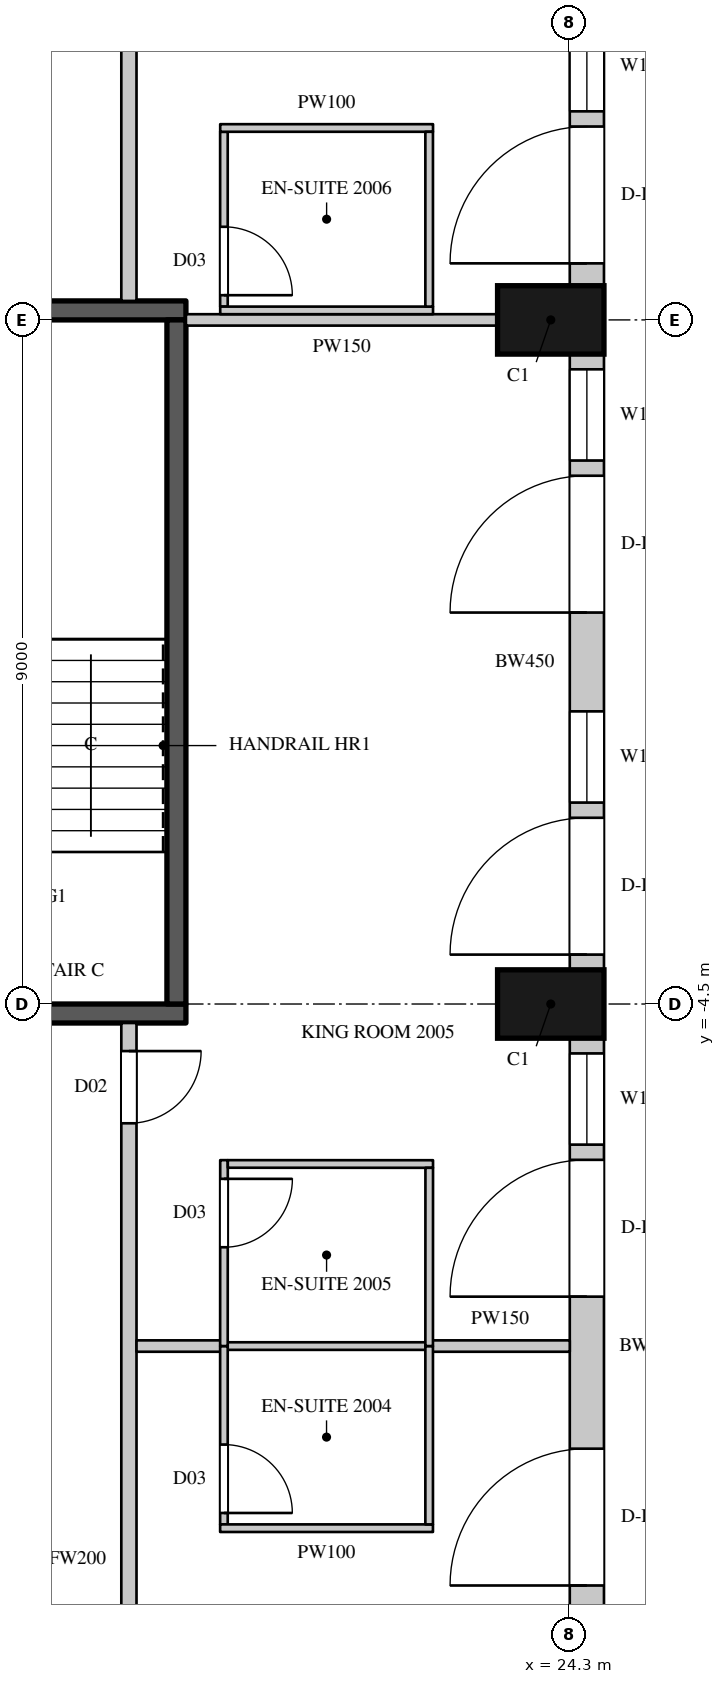
"""IFC4 building model, lengths in metres.
Left out: names, types, materials, properties, quantities, classifications, styles, units other than length and angle.
Written with IfcOpenShell. Run it as: python <this file> out.ifc"""

import sys

from ifc_helpers import new_model, si_unit, direction, frame, frame_2d, origin, origin_2d, place, context, subcontext, project, spatial, rectangle, extrude, element, fill, save


model = new_model("IFC4")
c1 = context("Model", 3, precision=1e-05, world=origin(), true_north=direction((0.0, 1.0)))
c2 = subcontext(c1, "Body", "Model", "MODEL_VIEW")
j1 = project(units=[si_unit("LENGTHUNIT", "METRE"), si_unit("PLANEANGLEUNIT", "RADIAN")], contexts=[c1])
p1 = place(None, origin())
s1 = spatial("IfcSite", under=j1, at=p1, CompositionType="ELEMENT")
p2 = place(p1, origin())
s2 = spatial("IfcBuilding", under=s1, at=p2, CompositionType="ELEMENT")
p3 = place(p2, frame((0.0, 0.0, 102.3)))
s3 = spatial("IfcBuildingStorey", under=s2, at=p3, CompositionType="ELEMENT", Elevation=102.3)
for number, where, z_axis, x_axis in (
    (1, (24.05, -4.5, 0.0), (0.0, 0.0, 1.0), (0.0, 1.0, 0.0)),
    (2, (24.05, 4.5, 0.0), (0.0, 0.0, 1.0), (0.0, 1.0, 0.0)),
):
    element("IfcColumn", number, at=place(p3, frame(where, z_axis=z_axis, x_axis=x_axis)), inside=s3, PredefinedType="COLUMN", context=c2, shape_type="SweptSolid", body=[
        extrude(rectangle(XDim=0.9, YDim=1.4, at=origin_2d()), origin(), (0.0, 0.0, 1.0), 3.6),
    ])
p4 = place(p3, frame((24.525, -13.05, 0.0), z_axis=(0.0, 0.0, 1.0), x_axis=(0.0, 1.0, 0.0)))
e3 = element("IfcWall", 3, at=p4, inside=s3, PredefinedType="SOLIDWALL", context=c2, shape_type="SweptSolid", body=[
    extrude(rectangle(XDim=8.1, YDim=0.45, at=frame_2d((4.05, 0.0))), origin(), (0.0, 0.0, 1.0), 3.3),
])
p5 = place(p4, frame((0.9, 0.0, 0.0)))
e4 = element("IfcOpeningElement", 4, at=p5, cuts=e3, PredefinedType="OPENING", context=c2, shape_type="SweptSolid", body=[
    extrude(rectangle(XDim=1.8, YDim=2.4, at=frame_2d((0.9, 1.2))), frame((0.0, 0.235, 0.0), z_axis=(0.0, -1.0, 0.0), x_axis=(1.0, 0.0, 0.0)), (0.0, 0.0, 1.0), 0.47),
])
p6 = place(p4, frame((4.7, 0.0, 0.0)))
e5 = element("IfcOpeningElement", 5, at=p6, cuts=e3, PredefinedType="OPENING", context=c2, shape_type="SweptSolid", body=[
    extrude(rectangle(XDim=1.8, YDim=2.4, at=frame_2d((0.9, 1.2))), frame((0.0, 0.235, 0.0), z_axis=(0.0, -1.0, 0.0), x_axis=(1.0, 0.0, 0.0)), (0.0, 0.0, 1.0), 0.47),
])
p7 = place(p4, frame((6.7, 0.0, 1.05)))
e6 = element("IfcOpeningElement", 6, at=p7, cuts=e3, PredefinedType="OPENING", context=c2, shape_type="SweptSolid", body=[
    extrude(rectangle(XDim=1.2, YDim=2.0, at=frame_2d((0.6, 1.0))), frame((0.0, 0.235, 0.0), z_axis=(0.0, -1.0, 0.0), x_axis=(1.0, 0.0, 0.0)), (0.0, 0.0, 1.0), 0.47),
])
p8 = place(p3, frame((24.525, -4.05, 0.0), z_axis=(0.0, 0.0, 1.0), x_axis=(0.0, 1.0, 0.0)))
e7 = element("IfcWall", 7, at=p8, inside=s3, PredefinedType="SOLIDWALL", context=c2, shape_type="SweptSolid", body=[
    extrude(rectangle(XDim=8.1, YDim=0.45, at=frame_2d((4.05, 0.0))), origin(), (0.0, 0.0, 1.0), 3.3),
])
p9 = place(p8, frame((0.2, 0.0, 0.0)))
e8 = element("IfcOpeningElement", 8, at=p9, cuts=e7, PredefinedType="OPENING", context=c2, shape_type="SweptSolid", body=[
    extrude(rectangle(XDim=1.8, YDim=2.4, at=frame_2d((0.9, 1.2))), frame((0.0, 0.235, 0.0), z_axis=(0.0, -1.0, 0.0), x_axis=(1.0, 0.0, 0.0)), (0.0, 0.0, 1.0), 0.47),
])
p10 = place(p8, frame((2.2, 0.0, 1.05)))
e9 = element("IfcOpeningElement", 9, at=p10, cuts=e7, PredefinedType="OPENING", context=c2, shape_type="SweptSolid", body=[
    extrude(rectangle(XDim=1.2, YDim=2.0, at=frame_2d((0.6, 1.0))), frame((0.0, 0.235, 0.0), z_axis=(0.0, -1.0, 0.0), x_axis=(1.0, 0.0, 0.0)), (0.0, 0.0, 1.0), 0.47),
])
p11 = place(p8, frame((4.7, 0.0, 0.0)))
e10 = element("IfcOpeningElement", 10, at=p11, cuts=e7, PredefinedType="OPENING", context=c2, shape_type="SweptSolid", body=[
    extrude(rectangle(XDim=1.8, YDim=2.4, at=frame_2d((0.9, 1.2))), frame((0.0, 0.235, 0.0), z_axis=(0.0, -1.0, 0.0), x_axis=(1.0, 0.0, 0.0)), (0.0, 0.0, 1.0), 0.47),
])
p12 = place(p8, frame((6.7, 0.0, 1.05)))
e11 = element("IfcOpeningElement", 11, at=p12, cuts=e7, PredefinedType="OPENING", context=c2, shape_type="SweptSolid", body=[
    extrude(rectangle(XDim=1.2, YDim=2.0, at=frame_2d((0.6, 1.0))), frame((0.0, 0.235, 0.0), z_axis=(0.0, -1.0, 0.0), x_axis=(1.0, 0.0, 0.0)), (0.0, 0.0, 1.0), 0.47),
])
p13 = place(p3, frame((24.525, 4.95, 0.0), z_axis=(0.0, 0.0, 1.0), x_axis=(0.0, 1.0, 0.0)))
e12 = element("IfcWall", 12, at=p13, inside=s3, PredefinedType="SOLIDWALL", context=c2, shape_type="SweptSolid", body=[
    extrude(rectangle(XDim=8.439, YDim=0.45, at=frame_2d((4.219, 0.0))), origin(), (0.0, 0.0, 1.0), 3.3),
])
p14 = place(p13, frame((0.294, 0.0, 0.0)))
e13 = element("IfcOpeningElement", 13, at=p14, cuts=e12, PredefinedType="OPENING", context=c2, shape_type="SweptSolid", body=[
    extrude(rectangle(XDim=1.8, YDim=2.4, at=frame_2d((0.9, 1.2))), frame((0.0, 0.235, 0.0), z_axis=(0.0, -1.0, 0.0), x_axis=(1.0, 0.0, 0.0)), (0.0, 0.0, 1.0), 0.47),
])
p15 = place(p13, frame((2.294, 0.0, 1.05)))
e14 = element("IfcOpeningElement", 14, at=p15, cuts=e12, PredefinedType="OPENING", context=c2, shape_type="SweptSolid", body=[
    extrude(rectangle(XDim=1.2, YDim=2.0, at=frame_2d((0.6, 1.0))), frame((0.0, 0.235, 0.0), z_axis=(0.0, -1.0, 0.0), x_axis=(1.0, 0.0, 0.0)), (0.0, 0.0, 1.0), 0.47),
])
p16 = place(p13, frame((5.232, 0.0, 1.05)))
e15 = element("IfcOpeningElement", 15, at=p16, cuts=e12, PredefinedType="OPENING", context=c2, shape_type="SweptSolid", body=[
    extrude(rectangle(XDim=2.7, YDim=2.0, at=frame_2d((1.35, 1.0))), frame((0.0, 0.235, 0.0), z_axis=(0.0, -1.0, 0.0), x_axis=(1.0, 0.0, 0.0)), (0.0, 0.0, 1.0), 0.47),
])
p17 = place(p3, frame((18.5, -18.869, 0.0), z_axis=(0.0, 0.0, 1.0), x_axis=(0.0, 1.0, 0.0)))
e16 = element("IfcWall", 16, at=p17, inside=s3, PredefinedType="PARTITIONING", context=c2, shape_type="SweptSolid", body=[
    extrude(rectangle(XDim=14.119, YDim=0.2, at=frame_2d((7.06, 0.0))), origin(), (0.0, 0.0, 1.0), 3.3),
])
p18 = place(p17, frame((3.4, 0.0, 0.0)))
e17 = element("IfcOpeningElement", 17, at=p18, cuts=e16, PredefinedType="OPENING", context=c2, shape_type="SweptSolid", body=[
    extrude(rectangle(XDim=0.95, YDim=2.2, at=frame_2d((0.475, 1.1))), frame((0.0, 0.11, 0.0), z_axis=(0.0, -1.0, 0.0), x_axis=(1.0, 0.0, 0.0)), (0.0, 0.0, 1.0), 0.22),
])
p19 = place(p17, frame((12.8, 0.0, 0.0)))
e18 = element("IfcOpeningElement", 18, at=p19, cuts=e16, PredefinedType="OPENING", context=c2, shape_type="SweptSolid", body=[
    extrude(rectangle(XDim=0.95, YDim=2.2, at=frame_2d((0.475, 1.1))), frame((0.0, 0.11, 0.0), z_axis=(0.0, -1.0, 0.0), x_axis=(1.0, 0.0, 0.0)), (0.0, 0.0, 1.0), 0.22),
])
p20 = place(p3, frame((18.5, 4.75, 0.0), z_axis=(0.0, 0.0, 1.0), x_axis=(0.0, 1.0, 0.0)))
e19 = element("IfcWall", 19, at=p20, inside=s3, PredefinedType="PARTITIONING", context=c2, shape_type="SweptSolid", body=[
    extrude(rectangle(XDim=14.434, YDim=0.2, at=frame_2d((7.217, 0.0))), origin(), (0.0, 0.0, 1.0), 3.3),
])
p21 = place(p20, frame((7.65, 0.0, 0.0)))
e20 = element("IfcOpeningElement", 20, at=p21, cuts=e19, PredefinedType="OPENING", context=c2, shape_type="SweptSolid", body=[
    extrude(rectangle(XDim=0.95, YDim=2.2, at=frame_2d((0.475, 1.1))), frame((0.0, 0.11, 0.0), z_axis=(0.0, -1.0, 0.0), x_axis=(1.0, 0.0, 0.0)), (0.0, 0.0, 1.0), 0.22),
])
p22 = place(p3, frame((18.6, -9.0, 0.0), z_axis=(0.0, 0.0, 1.0), x_axis=(1.0, 0.0, 0.0)))
e21 = element("IfcWall", 21, at=p22, inside=s3, PredefinedType="PARTITIONING", context=c2, shape_type="SweptSolid", body=[
    extrude(rectangle(XDim=1.13, YDim=0.15, at=frame_2d((0.565, 0.0))), origin(), (0.0, 0.0, 1.0), 2.65),
])
p23 = place(p3, frame((19.25, 4.5, 0.0), z_axis=(0.0, 0.0, 1.0), x_axis=(1.0, 0.0, 0.0)))
e22 = element("IfcWall", 22, at=p23, inside=s3, PredefinedType="PARTITIONING", context=c2, shape_type="SweptSolid", body=[
    extrude(rectangle(XDim=4.1, YDim=0.15, at=frame_2d((2.05, 0.0))), origin(), (0.0, 0.0, 1.0), 3.3),
])
p24 = place(p3, frame((22.47, -9.0, 0.0), z_axis=(0.0, 0.0, 1.0), x_axis=(1.0, 0.0, 0.0)))
e23 = element("IfcWall", 23, at=p24, inside=s3, PredefinedType="PARTITIONING", context=c2, shape_type="SweptSolid", body=[
    extrude(rectangle(XDim=1.83, YDim=0.15, at=frame_2d((0.915, 0.0))), origin(), (0.0, 0.0, 1.0), 2.65),
])
for number, where, z_axis, x_axis in (
    (24, (14.55, -4.625, 0.0), (0.0, 0.0, 1.0), (1.0, 0.0, 0.0)),
    (25, (14.55, 4.625, 0.0), (0.0, 0.0, 1.0), (1.0, 0.0, 0.0)),
):
    element("IfcWall", number, at=place(p3, frame(where, z_axis=z_axis, x_axis=x_axis)), inside=s3, PredefinedType="SHEAR", context=c2, shape_type="SweptSolid", body=[
        extrude(rectangle(XDim=4.7, YDim=0.25, at=frame_2d((2.35, 0.0))), origin(), (0.0, 0.0, 1.0), 3.3),
    ])
p25 = place(p3, frame((19.125, -4.5, 0.0), z_axis=(0.0, 0.0, 1.0), x_axis=(0.0, 1.0, 0.0)))
e26 = element("IfcWall", 26, at=p25, inside=s3, PredefinedType="SHEAR", context=c2, shape_type="SweptSolid", body=[
    extrude(rectangle(XDim=9.0, YDim=0.25, at=frame_2d((4.5, 0.0))), origin(), (0.0, 0.0, 1.0), 3.3),
])
p26 = place(p3, frame((19.73, -9.0, 0.0), z_axis=(0.0, 0.0, 1.0), x_axis=(1.0, 0.0, 0.0)))
e27 = element("IfcWall", 27, at=p26, inside=s3, PredefinedType="PARTITIONING", context=c2, shape_type="SweptSolid", body=[
    extrude(rectangle(XDim=2.74, YDim=0.1, at=frame_2d((1.37, 0.0))), origin(), (0.0, 0.0, 1.0), 2.65),
])
p27 = place(p3, frame((19.75, -11.346, 0.0), z_axis=(0.0, 0.0, 1.0), x_axis=(0.0, 1.0, 0.0)))
e28 = element("IfcWall", 28, at=p27, inside=s3, PredefinedType="PARTITIONING", context=c2, shape_type="SweptSolid", body=[
    extrude(rectangle(XDim=2.346, YDim=0.1, at=frame_2d((1.173, 0.0))), origin(), (0.0, 0.0, 1.0), 3.3),
])
p28 = place(p27, frame((0.15, 0.0, 0.0)))
e29 = element("IfcOpeningElement", 29, at=p28, cuts=e28, PredefinedType="OPENING", context=c2, shape_type="SweptSolid", body=[
    extrude(rectangle(XDim=0.9, YDim=2.2, at=frame_2d((0.45, 1.1))), frame((0.0, 0.06, 0.0), z_axis=(0.0, -1.0, 0.0), x_axis=(1.0, 0.0, 0.0)), (0.0, 0.0, 1.0), 0.12),
])
p29 = place(p3, frame((19.7, -11.396, 0.0), z_axis=(0.0, 0.0, 1.0), x_axis=(1.0, 0.0, 0.0)))
e30 = element("IfcWall", 30, at=p29, inside=s3, PredefinedType="PARTITIONING", context=c2, shape_type="SweptSolid", body=[
    extrude(rectangle(XDim=2.8, YDim=0.1, at=frame_2d((1.4, 0.0))), origin(), (0.0, 0.0, 1.0), 3.3),
])
p30 = place(p3, frame((19.75, -9.0, 0.0), z_axis=(0.0, 0.0, 1.0), x_axis=(0.000399241409, 0.999999920303, 0.0)))
e31 = element("IfcWall", 31, at=p30, inside=s3, PredefinedType="PARTITIONING", context=c2, shape_type="SweptSolid", body=[
    extrude(rectangle(XDim=2.446, YDim=0.1, at=frame_2d((1.223, 0.0))), origin(), (0.0, 0.0, 1.0), 3.3),
])
p31 = place(p30, frame((1.3, 0.0, 0.0)))
e32 = element("IfcOpeningElement", 32, at=p31, cuts=e31, PredefinedType="OPENING", context=c2, shape_type="SweptSolid", body=[
    extrude(rectangle(XDim=0.9, YDim=2.2, at=frame_2d((0.45, 1.1))), frame((0.0, 0.06, 0.0), z_axis=(0.0, -1.0, 0.0), x_axis=(1.0, 0.0, 0.0)), (0.0, 0.0, 1.0), 0.12),
])
p32 = place(p3, frame((19.75, 4.675, 0.0), z_axis=(0.0, 0.0, 1.0), x_axis=(0.0, 1.0, 0.0)))
e33 = element("IfcWall", 33, at=p32, inside=s3, PredefinedType="PARTITIONING", context=c2, shape_type="SweptSolid", body=[
    extrude(rectangle(XDim=2.3, YDim=0.1, at=frame_2d((1.15, 0.0))), origin(), (0.0, 0.0, 1.0), 3.3),
])
p33 = place(p32, frame((0.15, 0.0, 0.0)))
e34 = element("IfcOpeningElement", 34, at=p33, cuts=e33, PredefinedType="OPENING", context=c2, shape_type="SweptSolid", body=[
    extrude(rectangle(XDim=0.9, YDim=2.2, at=frame_2d((0.45, 1.1))), frame((0.0, 0.06, 0.0), z_axis=(0.0, -1.0, 0.0), x_axis=(1.0, 0.0, 0.0)), (0.0, 0.0, 1.0), 0.12),
])
p34 = place(p3, frame((19.801, -6.604, 0.0), z_axis=(0.0, 0.0, 1.0), x_axis=(0.999999934588, -0.000361696332, 0.0)))
e35 = element("IfcWall", 35, at=p34, inside=s3, PredefinedType="PARTITIONING", context=c2, shape_type="SweptSolid", body=[
    extrude(rectangle(XDim=2.7, YDim=0.1, at=frame_2d((1.35, 0.0))), origin(), (0.0, 0.0, 1.0), 3.3),
])
for number, where, z_axis, x_axis in (
    (36, (19.701, 4.625, 0.0), (0.0, 0.0, 1.0), (1.0, 0.0, 0.0)),
    (37, (19.701, 7.025, 0.0), (0.0, 0.0, 1.0), (1.0, 0.0, 0.0)),
):
    element("IfcWall", number, at=place(p3, frame(where, z_axis=z_axis, x_axis=x_axis)), inside=s3, PredefinedType="PARTITIONING", context=c2, shape_type="SweptSolid", body=[
        extrude(rectangle(XDim=2.8, YDim=0.1, at=frame_2d((1.4, 0.0))), origin(), (0.0, 0.0, 1.0), 3.3),
    ])
p35 = place(p3, frame((22.45, -11.346, 0.0), z_axis=(0.0, 0.0, 1.0), x_axis=(0.0, 1.0, 0.0)))
e38 = element("IfcWall", 38, at=p35, inside=s3, PredefinedType="PARTITIONING", context=c2, shape_type="SweptSolid", body=[
    extrude(rectangle(XDim=2.346, YDim=0.1, at=frame_2d((1.173, 0.0))), origin(), (0.0, 0.0, 1.0), 3.3),
])
p36 = place(p3, frame((22.45, -9.0, 0.0), z_axis=(0.0, 0.0, 1.0), x_axis=(0.00041644973, 0.999999913285, 0.0)))
e39 = element("IfcWall", 39, at=p36, inside=s3, PredefinedType="PARTITIONING", context=c2, shape_type="SweptSolid", body=[
    extrude(rectangle(XDim=2.345, YDim=0.1, at=frame_2d((1.172, 0.0))), origin(), (0.0, 0.0, 1.0), 3.3),
])
p37 = place(p3, frame((22.45, 4.675, 0.0), z_axis=(0.0, 0.0, 1.0), x_axis=(0.0, 1.0, 0.0)))
e40 = element("IfcWall", 40, at=p37, inside=s3, PredefinedType="PARTITIONING", context=c2, shape_type="SweptSolid", body=[
    extrude(rectangle(XDim=2.3, YDim=0.1, at=frame_2d((1.15, 0.0))), origin(), (0.0, 0.0, 1.0), 3.3),
])
p38 = place(p5, origin())
e41 = element("IfcDoor", 41, at=p38, inside=s3, OperationType="SLIDING_TO_LEFT", PredefinedType="DOOR", context=c2, shape_type="SweptSolid", body=[
    extrude(rectangle(XDim=1.8, YDim=2.4, at=frame_2d((0.9, 1.2))), frame((0.0, 0.13, 0.0), z_axis=(0.0, -1.0, 0.0), x_axis=(1.0, 0.0, 0.0)), (0.0, 0.0, 1.0), 0.05),
])
fill(e4, e41)
p39 = place(p6, origin())
e42 = element("IfcDoor", 42, at=p39, inside=s3, OperationType="SLIDING_TO_LEFT", PredefinedType="DOOR", context=c2, shape_type="SweptSolid", body=[
    extrude(rectangle(XDim=1.8, YDim=2.4, at=frame_2d((0.9, 1.2))), frame((0.0, 0.13, 0.0), z_axis=(0.0, -1.0, 0.0), x_axis=(1.0, 0.0, 0.0)), (0.0, 0.0, 1.0), 0.05),
])
fill(e5, e42)
p40 = place(p7, origin())
e43 = element("IfcWindow", 43, at=p40, inside=s3, PartitioningType="SINGLE_PANEL", PredefinedType="WINDOW", context=c2, shape_type="SweptSolid", body=[
    extrude(rectangle(XDim=1.2, YDim=2.0, at=frame_2d((0.6, 1.0))), frame((0.0, 0.135, 0.0), z_axis=(0.0, -1.0, 0.0), x_axis=(1.0, 0.0, 0.0)), (0.0, 0.0, 1.0), 0.06),
])
fill(e6, e43)
p41 = place(p9, origin())
e44 = element("IfcDoor", 44, at=p41, inside=s3, OperationType="SLIDING_TO_LEFT", PredefinedType="DOOR", context=c2, shape_type="SweptSolid", body=[
    extrude(rectangle(XDim=1.8, YDim=2.4, at=frame_2d((0.9, 1.2))), frame((0.0, 0.13, 0.0), z_axis=(0.0, -1.0, 0.0), x_axis=(1.0, 0.0, 0.0)), (0.0, 0.0, 1.0), 0.05),
])
fill(e8, e44)
p42 = place(p10, origin())
e45 = element("IfcWindow", 45, at=p42, inside=s3, PartitioningType="SINGLE_PANEL", PredefinedType="WINDOW", context=c2, shape_type="SweptSolid", body=[
    extrude(rectangle(XDim=1.2, YDim=2.0, at=frame_2d((0.6, 1.0))), frame((0.0, 0.135, 0.0), z_axis=(0.0, -1.0, 0.0), x_axis=(1.0, 0.0, 0.0)), (0.0, 0.0, 1.0), 0.06),
])
fill(e9, e45)
p43 = place(p11, origin())
e46 = element("IfcDoor", 46, at=p43, inside=s3, OperationType="SLIDING_TO_LEFT", PredefinedType="DOOR", context=c2, shape_type="SweptSolid", body=[
    extrude(rectangle(XDim=1.8, YDim=2.4, at=frame_2d((0.9, 1.2))), frame((0.0, 0.13, 0.0), z_axis=(0.0, -1.0, 0.0), x_axis=(1.0, 0.0, 0.0)), (0.0, 0.0, 1.0), 0.05),
])
fill(e10, e46)
p44 = place(p12, origin())
e47 = element("IfcWindow", 47, at=p44, inside=s3, PartitioningType="SINGLE_PANEL", PredefinedType="WINDOW", context=c2, shape_type="SweptSolid", body=[
    extrude(rectangle(XDim=1.2, YDim=2.0, at=frame_2d((0.6, 1.0))), frame((0.0, 0.135, 0.0), z_axis=(0.0, -1.0, 0.0), x_axis=(1.0, 0.0, 0.0)), (0.0, 0.0, 1.0), 0.06),
])
fill(e11, e47)
p45 = place(p14, origin())
e48 = element("IfcDoor", 48, at=p45, inside=s3, OperationType="SLIDING_TO_LEFT", PredefinedType="DOOR", context=c2, shape_type="SweptSolid", body=[
    extrude(rectangle(XDim=1.8, YDim=2.4, at=frame_2d((0.9, 1.2))), frame((0.0, 0.13, 0.0), z_axis=(0.0, -1.0, 0.0), x_axis=(1.0, 0.0, 0.0)), (0.0, 0.0, 1.0), 0.05),
])
fill(e13, e48)
p46 = place(p15, origin())
e49 = element("IfcWindow", 49, at=p46, inside=s3, PartitioningType="SINGLE_PANEL", PredefinedType="WINDOW", context=c2, shape_type="SweptSolid", body=[
    extrude(rectangle(XDim=1.2, YDim=2.0, at=frame_2d((0.6, 1.0))), frame((0.0, 0.135, 0.0), z_axis=(0.0, -1.0, 0.0), x_axis=(1.0, 0.0, 0.0)), (0.0, 0.0, 1.0), 0.06),
])
fill(e14, e49)
p47 = place(p28, origin())
e50 = element("IfcDoor", 50, at=p47, inside=s3, OperationType="SINGLE_SWING_RIGHT", PredefinedType="DOOR", context=c2, shape_type="SweptSolid", body=[
    extrude(rectangle(XDim=0.9, YDim=2.2, at=frame_2d((0.45, 1.1))), frame((0.0, 0.025, 0.0), z_axis=(0.0, -1.0, 0.0), x_axis=(1.0, 0.0, 0.0)), (0.0, 0.0, 1.0), 0.05),
])
fill(e29, e50)
p48 = place(p19, origin())
e51 = element("IfcDoor", 51, at=p48, inside=s3, OperationType="SINGLE_SWING_LEFT", PredefinedType="DOOR", context=c2, shape_type="SweptSolid", body=[
    extrude(rectangle(XDim=0.95, YDim=2.2, at=frame_2d((0.475, 1.1))), frame((0.0, 0.025, 0.0), z_axis=(0.0, -1.0, 0.0), x_axis=(1.0, 0.0, 0.0)), (0.0, 0.0, 1.0), 0.05),
])
fill(e18, e51)
p49 = place(p31, origin())
e52 = element("IfcDoor", 52, at=p49, inside=s3, OperationType="SINGLE_SWING_LEFT", PredefinedType="DOOR", context=c2, shape_type="SweptSolid", body=[
    extrude(rectangle(XDim=0.9, YDim=2.2, at=frame_2d((0.45, 1.1))), frame((0.0, 0.025, 0.0), z_axis=(0.0, -1.0, 0.0), x_axis=(1.0, 0.0, 0.0)), (0.0, 0.0, 1.0), 0.05),
])
fill(e32, e52)
p50 = place(p33, origin())
e53 = element("IfcDoor", 53, at=p50, inside=s3, OperationType="SINGLE_SWING_RIGHT", PredefinedType="DOOR", context=c2, shape_type="SweptSolid", body=[
    extrude(rectangle(XDim=0.9, YDim=2.2, at=frame_2d((0.45, 1.1))), frame((0.0, 0.025, 0.0), z_axis=(0.0, -1.0, 0.0), x_axis=(1.0, 0.0, 0.0)), (0.0, 0.0, 1.0), 0.05),
])
fill(e34, e53)
save(model, sys.argv[1])
